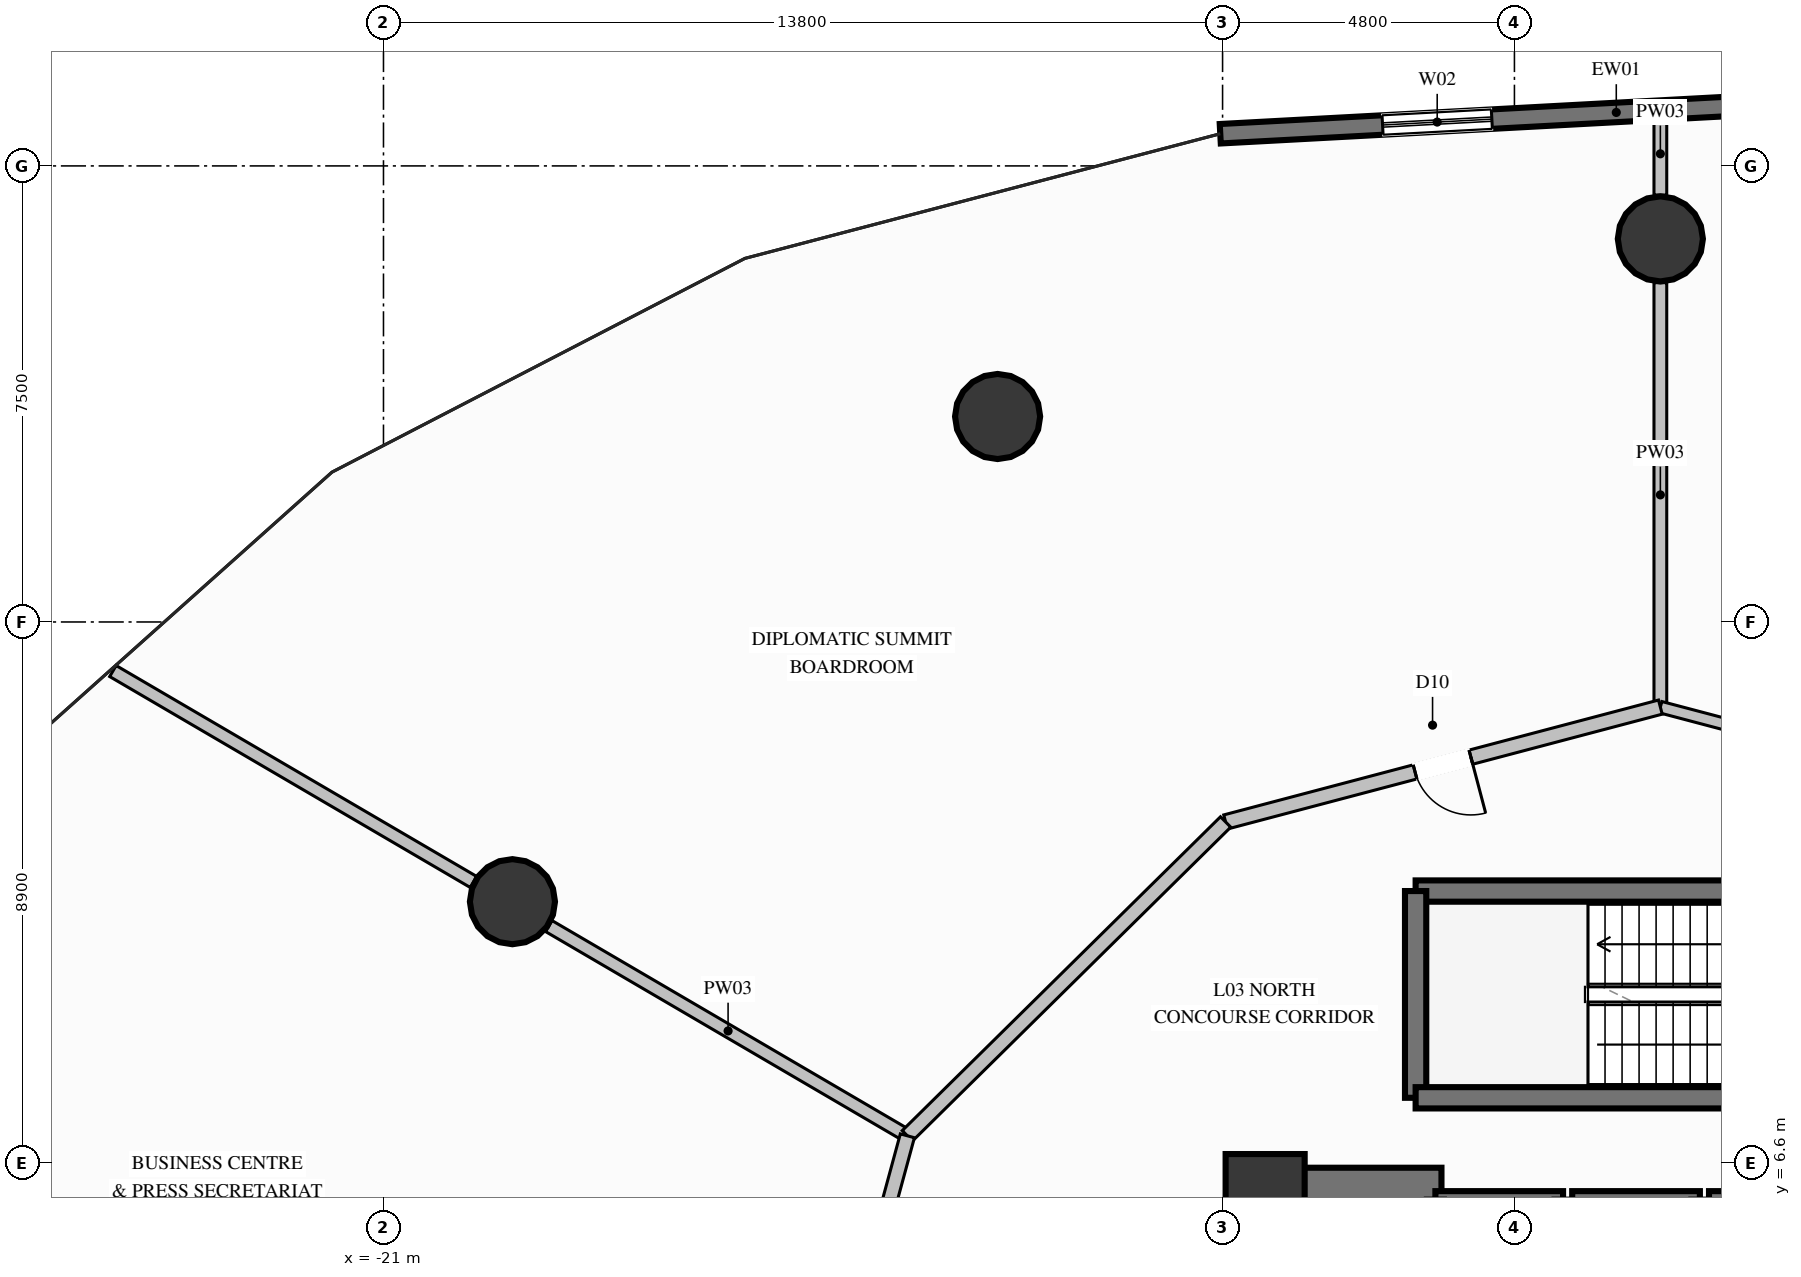
"""IFC4 building model, lengths in metres.
Left out: names, types, materials, properties, quantities, classifications, styles, units other than length and angle.
Written with IfcOpenShell. Run it as: python <this file> out.ifc"""

import sys

from ifc_helpers import new_model, si_unit, direction, frame, frame_2d, origin, origin_2d, place, context, subcontext, project, spatial, rectangle, circle, extrude, element, fill, save


model = new_model("IFC4")
c1 = context("Model", 3, precision=1e-05, world=origin(), true_north=direction((0.0, 1.0)))
c2 = subcontext(c1, "Body", "Model", "MODEL_VIEW")
j1 = project(units=[si_unit("LENGTHUNIT", "METRE"), si_unit("PLANEANGLEUNIT", "RADIAN")], contexts=[c1])
p1 = place(None, origin())
s1 = spatial("IfcSite", under=j1, at=p1, CompositionType="ELEMENT")
p2 = place(p1, origin())
s2 = spatial("IfcBuilding", under=s1, at=p2, CompositionType="ELEMENT")
p3 = place(p2, frame((0.0, 0.0, 18.6)))
s3 = spatial("IfcBuildingStorey", under=s2, at=p3, CompositionType="ELEMENT", Elevation=18.6)
p4 = place(p3, frame((-6.5, 6.1, 0.0), z_axis=(0.0, 0.0, 1.0), x_axis=(1.0, 0.0, 0.0)))
e1 = element("IfcColumn", 1, at=p4, inside=s3, PredefinedType="COLUMN", context=c2, shape_type="SweptSolid", body=[
    extrude(rectangle(XDim=1.3, YDim=1.3, at=origin_2d()), origin(), (0.0, 0.0, 1.0), 5.0),
])
p5 = place(p3, frame((-6.075, 6.1, 0.0), z_axis=(0.0, 0.0, 1.0), x_axis=(1.0, 0.0, 0.0)))
e2 = element("IfcWall", 2, at=p5, inside=s3, PredefinedType="SHEAR", context=c2, shape_type="SweptSolid", body=[
    extrude(rectangle(XDim=2.475, YDim=0.85, at=frame_2d((1.237, 0.0))), origin(), (0.0, 0.0, 1.0), 5.0),
])
p6 = place(p3, frame((-6.5, 2.35, 0.0), z_axis=(0.0, 0.0, 1.0), x_axis=(0.0, 1.0, 0.0)))
e3 = element("IfcWall", 3, at=p6, inside=s3, PredefinedType="SHEAR", context=c2, shape_type="SweptSolid", body=[
    extrude(rectangle(XDim=4.175, YDim=0.85, at=frame_2d((2.087, 0.0))), origin(), (0.0, 0.0, 1.0), 5.0),
])
for number, where, z_axis, x_axis in (
    (4, (0.0, 21.8, 0.0), (0.0, 0.0, 1.0), (1.0, 0.0, 0.0)),
    (5, (-10.9, 18.879, 0.0), (0.0, 0.0, 1.0), (1.0, 0.0, 0.0)),
    (6, (-18.879, 10.9, 0.0), (0.0, 0.0, 1.0), (1.0, 0.0, 0.0)),
):
    element("IfcColumn", number, at=place(p3, frame(where, z_axis=z_axis, x_axis=x_axis)), inside=s3, PredefinedType="COLUMN", context=c2, shape_type="SweptSolid", body=[
        extrude(circle(Radius=0.7, at=origin_2d()), origin(), (0.0, 0.0, 1.0), 5.0),
    ])
p7 = place(p3, frame((-7.238, 23.529, 0.0), z_axis=(0.0, 0.0, 1.0), x_axis=(0.998556298709, 0.053715159026, 0.0)))
e7 = element("IfcWall", 7, at=p7, inside=s3, PredefinedType="SOLIDWALL", context=c2, shape_type="SweptSolid", body=[
    extrude(rectangle(XDim=8.322, YDim=0.32, at=frame_2d((4.161, 0.0))), origin(), (0.0, 0.0, 1.0), 4.64),
])
p8 = place(p7, frame((2.673, 0.0, 0.65)))
e8 = element("IfcOpeningElement", 8, at=p8, cuts=e7, PredefinedType="OPENING", context=c2, shape_type="SweptSolid", body=[
    extrude(rectangle(XDim=1.8, YDim=2.6, at=frame_2d((0.9, 1.3))), frame((0.0, 0.17, 0.0), z_axis=(0.0, -1.0, 0.0), x_axis=(1.0, 0.0, 0.0)), (0.0, 0.0, 1.0), 0.34),
])
for number, where, z_axis, x_axis in (
    (9, (-1.6, 6.0, 0.0), (0.0, 0.0, 1.0), (-1.0, 0.0, 0.0)),
    (10, (0.65, 6.0, 0.0), (0.0, 0.0, 1.0), (-1.0, 0.0, 0.0)),
):
    element("IfcWall", number, at=place(p3, frame(where, z_axis=z_axis, x_axis=x_axis)), inside=s3, PredefinedType="SOLIDWALL", context=c2, shape_type="SweptSolid", body=[
        extrude(rectangle(XDim=2.1, YDim=0.28, at=frame_2d((1.05, 0.0))), origin(), (0.0, 0.0, 1.0), 4.64),
    ])
p9 = place(p3, frame((3.0, 6.0, 0.0), z_axis=(0.0, 0.0, 1.0), x_axis=(-1.0, 0.0, 0.0)))
e11 = element("IfcWall", 11, at=p9, inside=s3, PredefinedType="SOLIDWALL", context=c2, shape_type="SweptSolid", body=[
    extrude(rectangle(XDim=2.2, YDim=0.28, at=frame_2d((1.1, 0.0))), origin(), (0.0, 0.0, 1.0), 4.64),
])
p10 = place(p3, frame((4.025, 11.075, 0.0), z_axis=(0.0, 0.0, 1.0), x_axis=(-1.0, 0.0, 0.0)))
e12 = element("IfcWall", 12, at=p10, inside=s3, PredefinedType="SOLIDWALL", context=c2, shape_type="SweptSolid", body=[
    extrude(rectangle(XDim=8.05, YDim=0.35, at=frame_2d((4.025, 0.0))), origin(), (0.0, 0.0, 1.0), 4.64),
])
p11 = place(p3, frame((-4.025, 11.075, 0.0), z_axis=(0.0, 0.0, 1.0), x_axis=(0.0, -1.0, 0.0)))
e13 = element("IfcWall", 13, at=p11, inside=s3, PredefinedType="SOLIDWALL", context=c2, shape_type="SweptSolid", body=[
    extrude(rectangle(XDim=3.4, YDim=0.35, at=frame_2d((1.7, 0.0))), origin(), (0.0, 0.0, 1.0), 4.64),
])
p12 = place(p3, frame((-4.025, 7.675, 0.0), z_axis=(0.0, 0.0, 1.0), x_axis=(1.0, 0.0, 0.0)))
e14 = element("IfcWall", 14, at=p12, inside=s3, PredefinedType="SOLIDWALL", context=c2, shape_type="SweptSolid", body=[
    extrude(rectangle(XDim=8.05, YDim=0.35, at=frame_2d((4.025, 0.0))), origin(), (0.0, 0.0, 1.0), 4.64),
])
p13 = place(p3, frame((0.0, 14.1, 0.0), z_axis=(0.0, 0.0, 1.0), x_axis=(0.0, 1.0, 0.0)))
e15 = element("IfcWall", 15, at=p13, inside=s3, PredefinedType="PARTITIONING", context=c2, shape_type="SweptSolid", body=[
    extrude(rectangle(XDim=6.98, YDim=0.21, at=frame_2d((3.49, 0.0))), origin(), (0.0, 0.0, 1.0), 3.929),
])
p14 = place(p3, frame((0.0, 22.52, 0.0), z_axis=(0.0, 0.0, 1.0), x_axis=(0.0, 1.0, 0.0)))
e16 = element("IfcWall", 16, at=p14, inside=s3, PredefinedType="PARTITIONING", context=c2, shape_type="SweptSolid", body=[
    extrude(rectangle(XDim=1.358, YDim=0.21, at=frame_2d((0.679, 0.0))), origin(), (0.0, 0.0, 1.0), 4.64),
])
p15 = place(p3, frame((-12.384, 7.05, 0.0), z_axis=(0.0, 0.0, 1.0), x_axis=(-0.863200238908, 0.504861711313, 0.0)))
e17 = element("IfcWall", 17, at=p15, inside=s3, PredefinedType="PARTITIONING", context=c2, shape_type="SweptSolid", body=[
    extrude(rectangle(XDim=6.832, YDim=0.21, at=frame_2d((3.416, 0.0))), origin(), (0.0, 0.0, 1.0), 3.929),
])
p16 = place(p3, frame((-19.521, 11.225, 0.0), z_axis=(0.0, 0.0, 1.0), x_axis=(-0.863178834924, 0.504898305542, 0.0)))
e18 = element("IfcWall", 18, at=p16, inside=s3, PredefinedType="PARTITIONING", context=c2, shape_type="SweptSolid", body=[
    extrude(rectangle(XDim=6.869, YDim=0.21, at=frame_2d((3.434, 0.0))), origin(), (0.0, 0.0, 1.0), 4.64),
])
p17 = place(p3, frame((7.15, 12.211, 0.0), z_axis=(0.0, 0.0, 1.0), x_axis=(-0.966820901533, 0.255455170937, 0.0)))
e19 = element("IfcWall", 19, at=p17, inside=s3, PredefinedType="PARTITIONING", context=c2, shape_type="SweptSolid", body=[
    extrude(rectangle(XDim=7.395, YDim=0.19, at=frame_2d((3.698, 0.0))), origin(), (0.0, 0.0, 1.0), 4.219),
])
p18 = place(p3, frame((0.0, 14.1, 0.0), z_axis=(0.0, 0.0, 1.0), x_axis=(-0.966820901533, -0.255455170937, 0.0)))
e20 = element("IfcWall", 20, at=p18, inside=s3, PredefinedType="PARTITIONING", context=c2, shape_type="SweptSolid", body=[
    extrude(rectangle(XDim=7.395, YDim=0.24, at=frame_2d((3.698, 0.0))), origin(), (0.0, 0.0, 1.0), 4.219),
])
p19 = place(p18, frame((3.223, 0.0, 0.0)))
e21 = element("IfcOpeningElement", 21, at=p19, cuts=e20, PredefinedType="OPENING", context=c2, shape_type="SweptSolid", body=[
    extrude(rectangle(XDim=0.95, YDim=2.1, at=frame_2d((0.475, 1.05))), frame((0.0, 0.13, 0.0), z_axis=(0.0, -1.0, 0.0), x_axis=(1.0, 0.0, 0.0)), (0.0, 0.0, 1.0), 0.26),
])
p20 = place(p3, frame((-7.15, 12.211, 0.0), z_axis=(0.0, 0.0, 1.0), x_axis=(-0.712071304345, -0.702107155303, 0.0)))
e22 = element("IfcWall", 22, at=p20, inside=s3, PredefinedType="PARTITIONING", context=c2, shape_type="SweptSolid", body=[
    extrude(rectangle(XDim=7.351, YDim=0.24, at=frame_2d((3.675, 0.0))), origin(), (0.0, 0.0, 1.0), 4.64),
])
p21 = place(p3, frame((-12.384, 7.05, 0.0), z_axis=(0.0, 0.0, 1.0), x_axis=(-0.262260528785, -0.964997106235, 0.0)))
e23 = element("IfcWall", 23, at=p21, inside=s3, PredefinedType="PARTITIONING", context=c2, shape_type="SweptSolid", body=[
    extrude(rectangle(XDim=7.306, YDim=0.24, at=frame_2d((3.653, 0.0))), origin(), (0.0, 0.0, 1.0), 4.64),
])
p22 = place(p21, frame((3.178, 0.0, 0.0)))
e24 = element("IfcOpeningElement", 24, at=p22, cuts=e23, PredefinedType="OPENING", context=c2, shape_type="SweptSolid", body=[
    extrude(rectangle(XDim=0.95, YDim=2.1, at=frame_2d((0.475, 1.05))), frame((0.0, 0.13, 0.0), z_axis=(0.0, -1.0, 0.0), x_axis=(1.0, 0.0, 0.0)), (0.0, 0.0, 1.0), 0.26),
])
p23 = place(p8, origin())
e25 = element("IfcWindow", 25, at=p23, inside=s3, PartitioningType="SINGLE_PANEL", PredefinedType="WINDOW", context=c2, shape_type="SweptSolid", body=[
    extrude(rectangle(XDim=1.8, YDim=2.6, at=frame_2d((0.9, 1.3))), frame((0.0, 0.03, 0.0), z_axis=(0.0, -1.0, 0.0), x_axis=(1.0, 0.0, 0.0)), (0.0, 0.0, 1.0), 0.06),
])
fill(e8, e25)
p24 = place(p19, origin())
e26 = element("IfcDoor", 26, at=p24, inside=s3, OperationType="SINGLE_SWING_LEFT", PredefinedType="DOOR", context=c2, shape_type="SweptSolid", body=[
    extrude(rectangle(XDim=0.95, YDim=2.1, at=frame_2d((0.475, 1.05))), frame((0.0, 0.025, 0.0), z_axis=(0.0, -1.0, 0.0), x_axis=(1.0, 0.0, 0.0)), (0.0, 0.0, 1.0), 0.05),
])
fill(e21, e26)
save(model, sys.argv[1])
